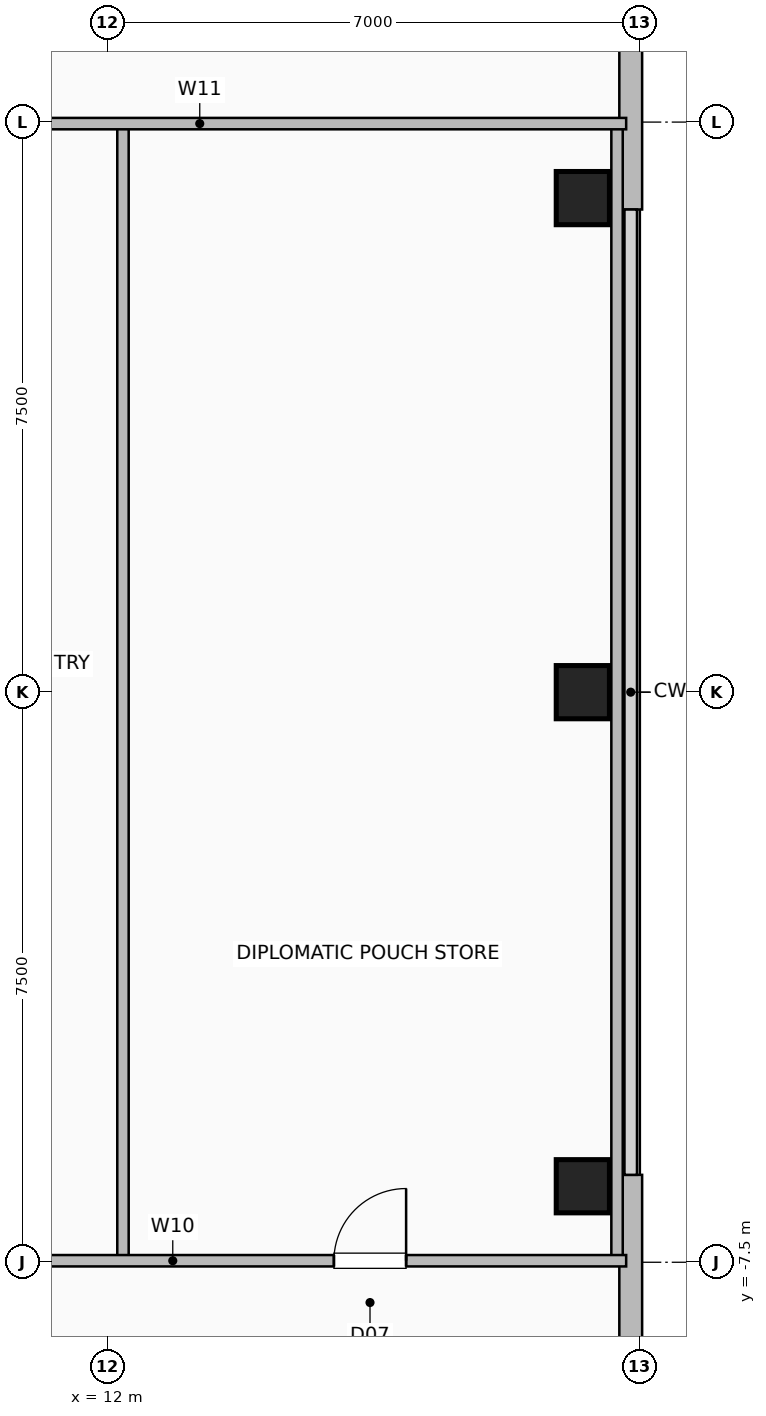
"""IFC4 building model, lengths in metres.
Left out: names, types, materials, properties, quantities, classifications, styles, units other than length and angle.
Written with IfcOpenShell. Run it as: python <this file> out.ifc"""

import sys

from ifc_helpers import new_model, si_unit, direction, frame, frame_2d, origin, origin_2d, place, context, subcontext, project, spatial, rectangle, hollow_rectangle, extrude, element, fill, save


model = new_model("IFC4")
c1 = context("Model", 3, precision=1e-05, world=origin(), true_north=direction((0.0, 1.0)))
c2 = subcontext(c1, "Body", "Model", "MODEL_VIEW")
j1 = project(units=[si_unit("LENGTHUNIT", "METRE"), si_unit("PLANEANGLEUNIT", "RADIAN")], contexts=[c1])
p1 = place(None, origin())
s1 = spatial("IfcSite", under=j1, at=p1, CompositionType="ELEMENT")
p2 = place(p1, origin())
s2 = spatial("IfcBuilding", under=s1, at=p2, CompositionType="ELEMENT")
p3 = place(p2, frame((0.0, 0.0, 236.0)))
s3 = spatial("IfcBuildingStorey", under=s2, at=p3, CompositionType="ELEMENT", Elevation=236.0)
for number, where, z_axis, x_axis in (
    (1, (18.25, -6.5, 0.0), (0.0, 0.0, 1.0), (1.0, 0.0, 0.0)),
    (2, (18.25, 0.0, 0.0), (0.0, 0.0, 1.0), (1.0, 0.0, 0.0)),
    (3, (18.25, 6.5, 0.0), (0.0, 0.0, 1.0), (1.0, 0.0, 0.0)),
):
    element("IfcColumn", number, at=place(p3, frame(where, z_axis=z_axis, x_axis=x_axis)), inside=s3, PredefinedType="COLUMN", context=c2, shape_type="SweptSolid", body=[
        extrude(hollow_rectangle(XDim=0.7, YDim=0.7, WallThickness=0.035, at=origin_2d()), origin(), (0.0, 0.0, 1.0), 3.6),
    ])
for number, where, z_axis, x_axis in (
    (4, (18.88, -11.65, 0.0), (0.0, 0.0, 1.0), (0.0, 1.0, 0.0)),
    (5, (18.88, 6.35, 0.0), (0.0, 0.0, 1.0), (0.0, 1.0, 0.0)),
):
    element("IfcWall", number, at=place(p3, frame(where, z_axis=z_axis, x_axis=x_axis)), inside=s3, PredefinedType="SOLIDWALL", context=c2, shape_type="SweptSolid", body=[
        extrude(rectangle(XDim=5.3, YDim=0.3, at=frame_2d((2.65, 0.0))), origin(), (0.0, 0.0, 1.0), 3.36),
    ])
for number, where, z_axis, x_axis in (
    (6, (12.2, -7.48, 0.0), (0.0, 0.0, 1.0), (0.0, 1.0, 0.0)),
    (7, (18.7, -7.48, 0.0), (0.0, 0.0, 1.0), (0.0, 1.0, 0.0)),
):
    element("IfcWall", number, at=place(p3, frame(where, z_axis=z_axis, x_axis=x_axis)), inside=s3, PredefinedType="PARTITIONING", context=c2, shape_type="SweptSolid", body=[
        extrude(rectangle(XDim=14.9, YDim=0.15, at=frame_2d((7.45, 0.0))), origin(), (0.0, 0.0, 1.0), 3.36),
    ])
p4 = place(p3, frame((8.28, -7.48, 0.0), z_axis=(0.0, 0.0, 1.0), x_axis=(1.0, 0.0, 0.0)))
e8 = element("IfcWall", 8, at=p4, inside=s3, PredefinedType="PARTITIONING", context=c2, shape_type="SweptSolid", body=[
    extrude(rectangle(XDim=10.54, YDim=0.15, at=frame_2d((5.27, 0.0))), origin(), (0.0, 0.0, 1.0), 3.36),
])
p5 = place(p4, frame((1.505, 0.0, 0.0)))
e9 = element("IfcOpeningElement", 9, at=p5, cuts=e8, PredefinedType="OPENING", context=c2, shape_type="SweptSolid", body=[
    extrude(rectangle(XDim=0.95, YDim=2.06, at=frame_2d((0.475, 1.03))), frame((0.0, 0.085, 0.0), z_axis=(0.0, -1.0, 0.0), x_axis=(1.0, 0.0, 0.0)), (0.0, 0.0, 1.0), 0.17),
])
p6 = place(p4, frame((6.695, 0.0, 0.0)))
e10 = element("IfcOpeningElement", 10, at=p6, cuts=e8, PredefinedType="OPENING", context=c2, shape_type="SweptSolid", body=[
    extrude(rectangle(XDim=0.95, YDim=2.06, at=frame_2d((0.475, 1.03))), frame((0.0, 0.085, 0.0), z_axis=(0.0, -1.0, 0.0), x_axis=(1.0, 0.0, 0.0)), (0.0, 0.0, 1.0), 0.17),
])
p7 = place(p3, frame((7.6, 7.48, 0.0), z_axis=(0.0, 0.0, 1.0), x_axis=(1.0, 0.0, 0.0)))
e11 = element("IfcWall", 11, at=p7, inside=s3, PredefinedType="PARTITIONING", context=c2, shape_type="SweptSolid", body=[
    extrude(rectangle(XDim=11.22, YDim=0.15, at=frame_2d((5.61, 0.0))), origin(), (0.0, 0.0, 1.0), 3.36),
])
p8 = place(p6, origin())
e12 = element("IfcDoor", 12, at=p8, inside=s3, OperationType="SINGLE_SWING_RIGHT", PredefinedType="DOOR", context=c2, shape_type="SweptSolid", body=[
    extrude(rectangle(XDim=0.95, YDim=2.06, at=frame_2d((0.475, 1.03))), frame((0.0, 0.025, 0.0), z_axis=(0.0, -1.0, 0.0), x_axis=(1.0, 0.0, 0.0)), (0.0, 0.0, 1.0), 0.05),
])
fill(e10, e12)
save(model, sys.argv[1])
